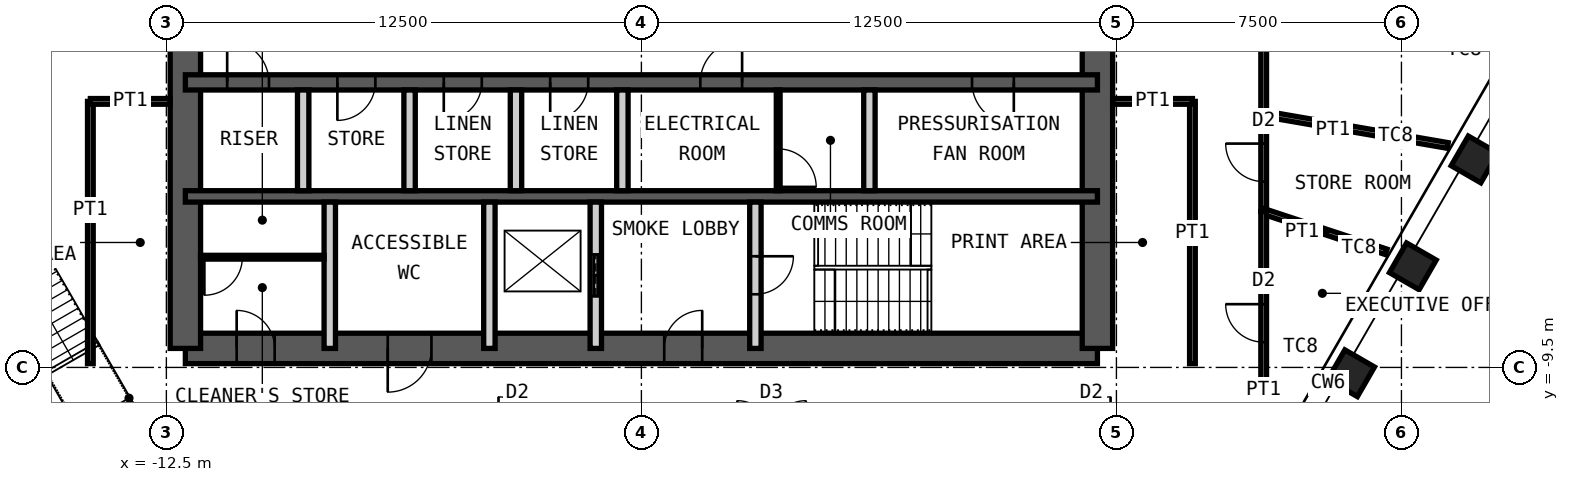
"""IFC4 building model, lengths in metres.
Left out: names, types, materials, properties, quantities, classifications, styles, units other than length and angle.
Written with IfcOpenShell. Run it as: python <this file> out.ifc"""

import sys

from ifc_helpers import new_model, si_unit, direction, frame, frame_2d, origin, origin_2d, place, context, subcontext, project, spatial, rectangle, hollow_rectangle, extrude, element, fill, save


model = new_model("IFC4")
c1 = context("Model", 3, precision=1e-05, world=origin(), true_north=direction((0.0, 1.0)))
c2 = subcontext(c1, "Body", "Model", "MODEL_VIEW")
j1 = project(units=[si_unit("LENGTHUNIT", "METRE"), si_unit("PLANEANGLEUNIT", "RADIAN")], contexts=[c1])
p1 = place(None, origin())
s1 = spatial("IfcSite", under=j1, at=p1, CompositionType="ELEMENT")
p2 = place(p1, origin())
s2 = spatial("IfcBuilding", under=s1, at=p2, CompositionType="ELEMENT")
p3 = place(p2, frame((0.0, 0.0, 329.2)))
s3 = spatial("IfcBuildingStorey", under=s2, at=p3, CompositionType="ELEMENT", Elevation=329.2)
for number, where, z_axis, x_axis in (
    (1, (21.924, -4.027, 0.0), (0.0, 0.0, 1.0), (0.5, 0.866, 0.0)),
    (2, (20.3, -6.84, 0.0), (0.0, 0.0, 1.0), (0.5, 0.866, 0.0)),
    (3, (18.676, -9.653, 0.0), (0.0, 0.0, 1.0), (0.5, 0.866, 0.0)),
):
    element("IfcColumn", number, at=place(p3, frame(where, z_axis=z_axis, x_axis=x_axis)), inside=s3, PredefinedType="COLUMN", context=c2, shape_type="SweptSolid", body=[
        extrude(hollow_rectangle(XDim=0.9, YDim=0.9, WallThickness=0.05, at=origin_2d()), origin(), (0.0, 0.0, 1.0), 4.2),
    ])
p4 = place(p3, frame((-12.0, -9.0, 0.0), z_axis=(0.0, 0.0, 1.0), x_axis=(1.0, 0.0, 0.0)))
e4 = element("IfcWall", 4, at=p4, inside=s3, PredefinedType="SHEAR", context=c2, shape_type="SweptSolid", body=[
    extrude(rectangle(XDim=24.0, YDim=0.8, at=frame_2d((12.0, 0.0))), origin(), (0.0, 0.0, 1.0), 4.2),
])
p5 = place(p4, frame((1.35, 0.0, 0.0)))
e5 = element("IfcOpeningElement", 5, at=p5, cuts=e4, PredefinedType="OPENING", context=c2, shape_type="SweptSolid", body=[
    extrude(rectangle(XDim=1.0, YDim=2.1, at=frame_2d((0.5, 1.05))), frame((0.0, 0.41, 0.0), z_axis=(0.0, -1.0, 0.0), x_axis=(1.0, 0.0, 0.0)), (0.0, 0.0, 1.0), 0.82),
])
p6 = place(p4, frame((5.325, 0.0, 0.0)))
e6 = element("IfcOpeningElement", 6, at=p6, cuts=e4, PredefinedType="OPENING", context=c2, shape_type="SweptSolid", body=[
    extrude(rectangle(XDim=1.15, YDim=2.1, at=frame_2d((0.575, 1.05))), frame((0.0, 0.41, 0.0), z_axis=(0.0, -1.0, 0.0), x_axis=(1.0, 0.0, 0.0)), (0.0, 0.0, 1.0), 0.82),
])
p7 = place(p4, frame((12.6, 0.0, 0.0)))
e7 = element("IfcOpeningElement", 7, at=p7, cuts=e4, PredefinedType="OPENING", context=c2, shape_type="SweptSolid", body=[
    extrude(rectangle(XDim=1.0, YDim=2.1, at=frame_2d((0.5, 1.05))), frame((0.0, 0.41, 0.0), z_axis=(0.0, -1.0, 0.0), x_axis=(1.0, 0.0, 0.0)), (0.0, 0.0, 1.0), 0.82),
])
p8 = place(p3, frame((12.0, -9.0, 0.0), z_axis=(0.0, 0.0, 1.0), x_axis=(0.0, 1.0, 0.0)))
e8 = element("IfcWall", 8, at=p8, inside=s3, PredefinedType="SHEAR", context=c2, shape_type="SweptSolid", body=[
    extrude(rectangle(XDim=18.0, YDim=0.8, at=frame_2d((9.0, 0.0))), origin(), (0.0, 0.0, 1.0), 4.2),
])
p9 = place(p8, frame((8.1, 0.0, 0.0)))
e9 = element("IfcOpeningElement", 9, at=p9, cuts=e8, PredefinedType="OPENING", context=c2, shape_type="SweptSolid", body=[
    extrude(rectangle(XDim=1.8, YDim=2.1, at=frame_2d((0.9, 1.05))), frame((0.0, 0.41, 0.0), z_axis=(0.0, -1.0, 0.0), x_axis=(1.0, 0.0, 0.0)), (0.0, 0.0, 1.0), 0.82),
])
p10 = place(p3, frame((-12.0, -9.0, 0.0), z_axis=(0.0, 0.0, 1.0), x_axis=(0.0, 1.0, 0.0)))
e10 = element("IfcWall", 10, at=p10, inside=s3, PredefinedType="SHEAR", context=c2, shape_type="SweptSolid", body=[
    extrude(rectangle(XDim=18.0, YDim=0.8, at=frame_2d((9.0, 0.0))), origin(), (0.0, 0.0, 1.0), 4.2),
])
p11 = place(p10, frame((8.1, 0.0, 0.0)))
e11 = element("IfcOpeningElement", 11, at=p11, cuts=e10, PredefinedType="OPENING", context=c2, shape_type="SweptSolid", body=[
    extrude(rectangle(XDim=1.8, YDim=2.1, at=frame_2d((0.9, 1.05))), frame((0.0, 0.41, 0.0), z_axis=(0.0, -1.0, 0.0), x_axis=(1.0, 0.0, 0.0)), (0.0, 0.0, 1.0), 0.82),
])
p12 = place(p3, frame((-12.0, -2.0, 0.0), z_axis=(0.0, 0.0, 1.0), x_axis=(1.0, 0.0, 0.0)))
e12 = element("IfcWall", 12, at=p12, inside=s3, PredefinedType="SHEAR", context=c2, shape_type="SweptSolid", body=[
    extrude(rectangle(XDim=24.0, YDim=0.4, at=frame_2d((12.0, 0.0))), origin(), (0.0, 0.0, 1.0), 4.2),
])
p13 = place(p12, frame((1.1, 0.0, 0.0)))
e13 = element("IfcOpeningElement", 13, at=p13, cuts=e12, PredefinedType="OPENING", context=c2, shape_type="SweptSolid", body=[
    extrude(rectangle(XDim=1.1, YDim=2.1, at=frame_2d((0.55, 1.05))), frame((0.0, 0.21, 0.0), z_axis=(0.0, -1.0, 0.0), x_axis=(1.0, 0.0, 0.0)), (0.0, 0.0, 1.0), 0.42),
])
p14 = place(p12, frame((13.55, 0.0, 0.0)))
e14 = element("IfcOpeningElement", 14, at=p14, cuts=e12, PredefinedType="OPENING", context=c2, shape_type="SweptSolid", body=[
    extrude(rectangle(XDim=1.1, YDim=2.1, at=frame_2d((0.55, 1.05))), frame((0.0, 0.21, 0.0), z_axis=(0.0, -1.0, 0.0), x_axis=(1.0, 0.0, 0.0)), (0.0, 0.0, 1.0), 0.42),
])
p15 = place(p12, frame((20.7, 0.0, 0.0)))
e15 = element("IfcOpeningElement", 15, at=p15, cuts=e12, PredefinedType="OPENING", context=c2, shape_type="SweptSolid", body=[
    extrude(rectangle(XDim=1.1, YDim=2.1, at=frame_2d((0.55, 1.05))), frame((0.0, 0.21, 0.0), z_axis=(0.0, -1.0, 0.0), x_axis=(1.0, 0.0, 0.0)), (0.0, 0.0, 1.0), 0.42),
])
p16 = place(p12, frame((4.0, 0.0, 0.0)))
e16 = element("IfcOpeningElement", 16, at=p16, cuts=e12, PredefinedType="OPENING", context=c2, shape_type="SweptSolid", body=[
    extrude(rectangle(XDim=1.0, YDim=2.1, at=frame_2d((0.5, 1.05))), frame((0.0, 0.21, 0.0), z_axis=(0.0, -1.0, 0.0), x_axis=(1.0, 0.0, 0.0)), (0.0, 0.0, 1.0), 0.42),
])
p17 = place(p12, frame((6.8, 0.0, 0.0)))
e17 = element("IfcOpeningElement", 17, at=p17, cuts=e12, PredefinedType="OPENING", context=c2, shape_type="SweptSolid", body=[
    extrude(rectangle(XDim=1.0, YDim=2.1, at=frame_2d((0.5, 1.05))), frame((0.0, 0.21, 0.0), z_axis=(0.0, -1.0, 0.0), x_axis=(1.0, 0.0, 0.0)), (0.0, 0.0, 1.0), 0.42),
])
p18 = place(p12, frame((9.6, 0.0, 0.0)))
e18 = element("IfcOpeningElement", 18, at=p18, cuts=e12, PredefinedType="OPENING", context=c2, shape_type="SweptSolid", body=[
    extrude(rectangle(XDim=1.0, YDim=2.1, at=frame_2d((0.5, 1.05))), frame((0.0, 0.21, 0.0), z_axis=(0.0, -1.0, 0.0), x_axis=(1.0, 0.0, 0.0)), (0.0, 0.0, 1.0), 0.42),
])
p19 = place(p3, frame((-12.0, -5.0, 0.0), z_axis=(0.0, 0.0, 1.0), x_axis=(1.0, 0.0, 0.0)))
e19 = element("IfcWall", 19, at=p19, inside=s3, PredefinedType="SHEAR", context=c2, shape_type="SweptSolid", body=[
    extrude(rectangle(XDim=24.0, YDim=0.3, at=frame_2d((12.0, 0.0))), origin(), (0.0, 0.0, 1.0), 4.2),
])
for number, where, z_axis, x_axis in (
    (20, (-8.9, -4.85, 0.0), (0.0, 0.0, 1.0), (0.0, 1.0, 0.0)),
    (21, (-6.1, -4.85, 0.0), (0.0, 0.0, 1.0), (0.0, 1.0, 0.0)),
    (22, (-3.3, -4.85, 0.0), (0.0, 0.0, 1.0), (0.0, 1.0, 0.0)),
    (23, (-0.5, -4.85, 0.0), (0.0, 0.0, 1.0), (0.0, 1.0, 0.0)),
    (24, (6.0, -4.85, 0.0), (0.0, 0.0, 1.0), (0.0, 1.0, 0.0)),
):
    element("IfcWall", number, at=place(p3, frame(where, z_axis=z_axis, x_axis=x_axis)), inside=s3, PredefinedType="PARTITIONING", context=c2, shape_type="SweptSolid", body=[
        extrude(rectangle(XDim=2.65, YDim=0.3, at=frame_2d((1.325, 0.0))), origin(), (0.0, 0.0, 1.0), 3.98),
    ])
for number, where, z_axis, x_axis in (
    (25, (-8.2, -9.0, 0.0), (0.0, 0.0, 1.0), (0.0, 1.0, 0.0)),
    (26, (-4.0, -9.0, 0.0), (0.0, 0.0, 1.0), (0.0, 1.0, 0.0)),
):
    element("IfcWall", number, at=place(p3, frame(where, z_axis=z_axis, x_axis=x_axis)), inside=s3, PredefinedType="PARTITIONING", context=c2, shape_type="SweptSolid", body=[
        extrude(rectangle(XDim=3.85, YDim=0.3, at=frame_2d((1.925, 0.0))), origin(), (0.0, 0.0, 1.0), 3.98),
    ])
p20 = place(p3, frame((-1.2, -9.0, 0.0), z_axis=(0.0, 0.0, 1.0), x_axis=(0.0, 1.0, 0.0)))
e27 = element("IfcWall", 27, at=p20, inside=s3, PredefinedType="PARTITIONING", context=c2, shape_type="SweptSolid", body=[
    extrude(rectangle(XDim=3.85, YDim=0.3, at=frame_2d((1.925, 0.0))), origin(), (0.0, 0.0, 1.0), 3.98),
])
p21 = place(p20, frame((1.375, 0.0, 0.0)))
e28 = element("IfcOpeningElement", 28, at=p21, cuts=e27, PredefinedType="OPENING", context=c2, shape_type="SweptSolid", body=[
    extrude(rectangle(XDim=1.1, YDim=2.4, at=frame_2d((0.55, 1.2))), frame((0.0, 0.16, 0.0), z_axis=(0.0, -1.0, 0.0), x_axis=(1.0, 0.0, 0.0)), (0.0, 0.0, 1.0), 0.32),
])
p22 = place(p3, frame((3.0, -9.0, 0.0), z_axis=(0.0, 0.0, 1.0), x_axis=(0.0, 1.0, 0.0)))
e29 = element("IfcWall", 29, at=p22, inside=s3, PredefinedType="PARTITIONING", context=c2, shape_type="SweptSolid", body=[
    extrude(rectangle(XDim=3.85, YDim=0.3, at=frame_2d((1.925, 0.0))), origin(), (0.0, 0.0, 1.0), 3.98),
])
p23 = place(p22, frame((1.425, 0.0, 0.0)))
e30 = element("IfcOpeningElement", 30, at=p23, cuts=e29, PredefinedType="OPENING", context=c2, shape_type="SweptSolid", body=[
    extrude(rectangle(XDim=1.0, YDim=2.1, at=frame_2d((0.5, 1.05))), frame((0.0, 0.16, 0.0), z_axis=(0.0, -1.0, 0.0), x_axis=(1.0, 0.0, 0.0)), (0.0, 0.0, 1.0), 0.32),
])
p24 = place(p3, frame((3.6, -4.85, 0.0), z_axis=(0.0, 0.0, 1.0), x_axis=(0.0, 1.0, 0.0)))
e31 = element("IfcWall", 31, at=p24, inside=s3, PredefinedType="PARTITIONING", context=c2, shape_type="SweptSolid", body=[
    extrude(rectangle(XDim=2.65, YDim=0.1, at=frame_2d((1.325, 0.0))), origin(), (0.0, 0.0, 1.0), 3.98),
])
p25 = place(p24, frame((0.1, 0.0, 0.0)))
e32 = element("IfcOpeningElement", 32, at=p25, cuts=e31, PredefinedType="OPENING", context=c2, shape_type="SweptSolid", body=[
    extrude(rectangle(XDim=1.0, YDim=2.4, at=frame_2d((0.5, 1.2))), frame((0.0, 0.06, 0.0), z_axis=(0.0, -1.0, 0.0), x_axis=(1.0, 0.0, 0.0)), (0.0, 0.0, 1.0), 0.12),
])
p26 = place(p3, frame((-11.6, -6.6, 0.0), z_axis=(0.0, 0.0, 1.0), x_axis=(1.0, 0.0, 0.0)))
e33 = element("IfcWall", 33, at=p26, inside=s3, PredefinedType="PARTITIONING", context=c2, shape_type="SweptSolid", body=[
    extrude(rectangle(XDim=3.25, YDim=0.1, at=frame_2d((1.625, 0.0))), origin(), (0.0, 0.0, 1.0), 3.98),
])
p27 = place(p26, frame((0.1, 0.0, 0.0)))
e34 = element("IfcOpeningElement", 34, at=p27, cuts=e33, PredefinedType="OPENING", context=c2, shape_type="SweptSolid", body=[
    extrude(rectangle(XDim=1.0, YDim=2.4, at=frame_2d((0.5, 1.2))), frame((0.0, 0.06, 0.0), z_axis=(0.0, -1.0, 0.0), x_axis=(1.0, 0.0, 0.0)), (0.0, 0.0, 1.0), 0.12),
])
p28 = place(p3, frame((16.375, 1.767, 0.0), z_axis=(0.0, 0.0, 1.0), x_axis=(0.0, -1.0, 0.0)))
e35 = element("IfcWall", 35, at=p28, inside=s3, PredefinedType="PARTITIONING", context=c2, shape_type="SweptSolid", body=[
    extrude(rectangle(XDim=4.591, YDim=0.15, at=frame_2d((2.296, 0.0))), origin(), (0.0, 0.0, 1.0), 4.03),
])
p29 = place(p28, frame((1.796, 0.0, 0.0)))
e36 = element("IfcOpeningElement", 36, at=p29, cuts=e35, PredefinedType="OPENING", context=c2, shape_type="SweptSolid", body=[
    extrude(rectangle(XDim=1.0, YDim=2.4, at=frame_2d((0.5, 1.2))), frame((0.0, 0.085, 0.0), z_axis=(0.0, -1.0, 0.0), x_axis=(1.0, 0.0, 0.0)), (0.0, 0.0, 1.0), 0.17),
])
p30 = place(p3, frame((21.219, -3.66, 0.0), z_axis=(0.0, 0.0, 1.0), x_axis=(-0.98545065103, 0.169961802723, 0.0)))
e37 = element("IfcWall", 37, at=p30, inside=s3, PredefinedType="PARTITIONING", context=c2, shape_type="SweptSolid", body=[
    extrude(rectangle(XDim=4.916, YDim=0.15, at=frame_2d((2.458, 0.0))), origin(), (0.0, 0.0, 1.0), 4.03),
])
p31 = place(p3, frame((16.375, -2.825, 0.0), z_axis=(0.0, 0.0, 1.0), x_axis=(0.0, -1.0, 0.0)))
e38 = element("IfcWall", 38, at=p31, inside=s3, PredefinedType="PARTITIONING", context=c2, shape_type="SweptSolid", body=[
    extrude(rectangle(XDim=2.572, YDim=0.15, at=frame_2d((1.286, 0.0))), origin(), (0.0, 0.0, 1.0), 4.03),
])
p32 = place(p31, frame((0.786, 0.0, 0.0)))
e39 = element("IfcOpeningElement", 39, at=p32, cuts=e38, PredefinedType="OPENING", context=c2, shape_type="SweptSolid", body=[
    extrude(rectangle(XDim=1.0, YDim=2.4, at=frame_2d((0.5, 1.2))), frame((0.0, 0.085, 0.0), z_axis=(0.0, -1.0, 0.0), x_axis=(1.0, 0.0, 0.0)), (0.0, 0.0, 1.0), 0.17),
])
p33 = place(p3, frame((19.598, -6.459, 0.0), z_axis=(0.0, 0.0, 1.0), x_axis=(-0.949756799168, 0.312988853532, 0.0)))
e40 = element("IfcWall", 40, at=p33, inside=s3, PredefinedType="PARTITIONING", context=c2, shape_type="SweptSolid", body=[
    extrude(rectangle(XDim=3.394, YDim=0.15, at=frame_2d((1.697, 0.0))), origin(), (0.0, 0.0, 1.0), 3.33),
])
p34 = place(p3, frame((16.375, -5.396, 0.0), z_axis=(0.0, 0.0, 1.0), x_axis=(0.0, -1.0, 0.0)))
e41 = element("IfcWall", 41, at=p34, inside=s3, PredefinedType="PARTITIONING", context=c2, shape_type="SweptSolid", body=[
    extrude(rectangle(XDim=5.878, YDim=0.15, at=frame_2d((2.939, 0.0))), origin(), (0.0, 0.0, 1.0), 4.03),
])
p35 = place(p34, frame((2.439, 0.0, 0.0)))
e42 = element("IfcOpeningElement", 42, at=p35, cuts=e41, PredefinedType="OPENING", context=c2, shape_type="SweptSolid", body=[
    extrude(rectangle(XDim=1.0, YDim=2.4, at=frame_2d((0.5, 1.2))), frame((0.0, 0.085, 0.0), z_axis=(0.0, -1.0, 0.0), x_axis=(1.0, 0.0, 0.0)), (0.0, 0.0, 1.0), 0.17),
])
p36 = place(p3, frame((14.5, -9.4, 0.0), z_axis=(0.0, 0.0, 1.0), x_axis=(0.0, 1.0, 0.0)))
e43 = element("IfcWall", 43, at=p36, inside=s3, PredefinedType="PARTITIONING", context=c2, shape_type="SweptSolid", body=[
    extrude(rectangle(XDim=6.9, YDim=0.15, at=frame_2d((3.45, 0.0))), origin(), (0.0, 0.0, 1.0), 4.03),
])
p37 = place(p3, frame((12.4, -2.5, 0.0), z_axis=(0.0, 0.0, 1.0), x_axis=(1.0, 0.0, 0.0)))
e44 = element("IfcWall", 44, at=p37, inside=s3, PredefinedType="PARTITIONING", context=c2, shape_type="SweptSolid", body=[
    extrude(rectangle(XDim=2.1, YDim=0.15, at=frame_2d((1.05, 0.0))), origin(), (0.0, 0.0, 1.0), 3.33),
])
p38 = place(p3, frame((-14.5, -9.4, 0.0), z_axis=(0.0, 0.0, 1.0), x_axis=(0.0, 1.0, 0.0)))
e45 = element("IfcWall", 45, at=p38, inside=s3, PredefinedType="PARTITIONING", context=c2, shape_type="SweptSolid", body=[
    extrude(rectangle(XDim=6.9, YDim=0.15, at=frame_2d((3.45, 0.0))), origin(), (0.0, 0.0, 1.0), 4.03),
])
p39 = place(p3, frame((-12.4, -2.5, 0.0), z_axis=(0.0, 0.0, 1.0), x_axis=(-1.0, 0.0, 0.0)))
e46 = element("IfcWall", 46, at=p39, inside=s3, PredefinedType="PARTITIONING", context=c2, shape_type="SweptSolid", body=[
    extrude(rectangle(XDim=2.1, YDim=0.15, at=frame_2d((1.05, 0.0))), origin(), (0.0, 0.0, 1.0), 3.53),
])
p40 = place(p5, origin())
e47 = element("IfcDoor", 47, at=p40, inside=s3, OperationType="SINGLE_SWING_RIGHT", PredefinedType="DOOR", context=c2, shape_type="SweptSolid", body=[
    extrude(rectangle(XDim=1.0, YDim=2.1, at=frame_2d((0.5, 1.05))), frame((0.0, 0.025, 0.0), z_axis=(0.0, -1.0, 0.0), x_axis=(1.0, 0.0, 0.0)), (0.0, 0.0, 1.0), 0.05),
])
fill(e5, e47)
p41 = place(p6, origin())
e48 = element("IfcDoor", 48, at=p41, inside=s3, OperationType="SINGLE_SWING_LEFT", PredefinedType="DOOR", context=c2, shape_type="SweptSolid", body=[
    extrude(rectangle(XDim=1.15, YDim=2.1, at=frame_2d((0.575, 1.05))), frame((0.0, 0.025, 0.0), z_axis=(0.0, -1.0, 0.0), x_axis=(1.0, 0.0, 0.0)), (0.0, 0.0, 1.0), 0.05),
])
fill(e6, e48)
p42 = place(p7, origin())
e49 = element("IfcDoor", 49, at=p42, inside=s3, OperationType="SINGLE_SWING_LEFT", PredefinedType="DOOR", context=c2, shape_type="SweptSolid", body=[
    extrude(rectangle(XDim=1.0, YDim=2.1, at=frame_2d((0.5, 1.05))), frame((0.0, 0.025, 0.0), z_axis=(0.0, -1.0, 0.0), x_axis=(1.0, 0.0, 0.0)), (0.0, 0.0, 1.0), 0.05),
])
fill(e7, e49)
p43 = place(p23, origin())
e50 = element("IfcDoor", 50, at=p43, inside=s3, OperationType="SINGLE_SWING_RIGHT", PredefinedType="DOOR", context=c2, shape_type="SweptSolid", body=[
    extrude(rectangle(XDim=1.0, YDim=2.1, at=frame_2d((0.5, 1.05))), frame((0.0, 0.025, 0.0), z_axis=(0.0, -1.0, 0.0), x_axis=(1.0, 0.0, 0.0)), (0.0, 0.0, 1.0), 0.05),
])
fill(e30, e50)
p44 = place(p13, origin())
e51 = element("IfcDoor", 51, at=p44, inside=s3, OperationType="SINGLE_SWING_RIGHT", PredefinedType="DOOR", context=c2, shape_type="SweptSolid", body=[
    extrude(rectangle(XDim=1.1, YDim=2.1, at=frame_2d((0.55, 1.05))), frame((0.0, 0.025, 0.0), z_axis=(0.0, -1.0, 0.0), x_axis=(1.0, 0.0, 0.0)), (0.0, 0.0, 1.0), 0.05),
])
fill(e13, e51)
p45 = place(p14, origin())
e52 = element("IfcDoor", 52, at=p45, inside=s3, OperationType="SINGLE_SWING_LEFT", PredefinedType="DOOR", context=c2, shape_type="SweptSolid", body=[
    extrude(rectangle(XDim=1.1, YDim=2.1, at=frame_2d((0.55, 1.05))), frame((0.0, 0.025, 0.0), z_axis=(0.0, -1.0, 0.0), x_axis=(1.0, 0.0, 0.0)), (0.0, 0.0, 1.0), 0.05),
])
fill(e14, e52)
p46 = place(p15, origin())
e53 = element("IfcDoor", 53, at=p46, inside=s3, OperationType="SINGLE_SWING_RIGHT", PredefinedType="DOOR", context=c2, shape_type="SweptSolid", body=[
    extrude(rectangle(XDim=1.1, YDim=2.1, at=frame_2d((0.55, 1.05))), frame((0.0, 0.025, 0.0), z_axis=(0.0, -1.0, 0.0), x_axis=(1.0, 0.0, 0.0)), (0.0, 0.0, 1.0), 0.05),
])
fill(e15, e53)
p47 = place(p21, origin())
e54 = element("IfcDoor", 54, at=p47, inside=s3, OperationType="DOUBLE_DOOR_SLIDING", PredefinedType="DOOR", context=c2, shape_type="SweptSolid", body=[
    extrude(rectangle(XDim=1.1, YDim=2.4, at=frame_2d((0.55, 1.2))), frame((0.0, 0.025, 0.0), z_axis=(0.0, -1.0, 0.0), x_axis=(1.0, 0.0, 0.0)), (0.0, 0.0, 1.0), 0.05),
])
fill(e28, e54)
p48 = place(p16, origin())
e55 = element("IfcDoor", 55, at=p48, inside=s3, OperationType="SINGLE_SWING_LEFT", PredefinedType="DOOR", context=c2, shape_type="SweptSolid", body=[
    extrude(rectangle(XDim=1.0, YDim=2.1, at=frame_2d((0.5, 1.05))), frame((0.0, 0.025, 0.0), z_axis=(0.0, -1.0, 0.0), x_axis=(1.0, 0.0, 0.0)), (0.0, 0.0, 1.0), 0.05),
])
fill(e16, e55)
p49 = place(p17, origin())
e56 = element("IfcDoor", 56, at=p49, inside=s3, OperationType="SINGLE_SWING_LEFT", PredefinedType="DOOR", context=c2, shape_type="SweptSolid", body=[
    extrude(rectangle(XDim=1.0, YDim=2.1, at=frame_2d((0.5, 1.05))), frame((0.0, 0.025, 0.0), z_axis=(0.0, -1.0, 0.0), x_axis=(1.0, 0.0, 0.0)), (0.0, 0.0, 1.0), 0.05),
])
fill(e17, e56)
p50 = place(p18, origin())
e57 = element("IfcDoor", 57, at=p50, inside=s3, OperationType="SINGLE_SWING_LEFT", PredefinedType="DOOR", context=c2, shape_type="SweptSolid", body=[
    extrude(rectangle(XDim=1.0, YDim=2.1, at=frame_2d((0.5, 1.05))), frame((0.0, 0.025, 0.0), z_axis=(0.0, -1.0, 0.0), x_axis=(1.0, 0.0, 0.0)), (0.0, 0.0, 1.0), 0.05),
])
fill(e18, e57)
p51 = place(p25, origin())
e58 = element("IfcDoor", 58, at=p51, inside=s3, OperationType="SINGLE_SWING_LEFT", PredefinedType="DOOR", context=c2, shape_type="SweptSolid", body=[
    extrude(rectangle(XDim=1.0, YDim=2.4, at=frame_2d((0.5, 1.2))), frame((0.0, 0.025, 0.0), z_axis=(0.0, -1.0, 0.0), x_axis=(1.0, 0.0, 0.0)), (0.0, 0.0, 1.0), 0.05),
])
fill(e32, e58)
p52 = place(p27, origin())
e59 = element("IfcDoor", 59, at=p52, inside=s3, OperationType="SINGLE_SWING_LEFT", PredefinedType="DOOR", context=c2, shape_type="SweptSolid", body=[
    extrude(rectangle(XDim=1.0, YDim=2.4, at=frame_2d((0.5, 1.2))), frame((0.0, 0.025, 0.0), z_axis=(0.0, -1.0, 0.0), x_axis=(1.0, 0.0, 0.0)), (0.0, 0.0, 1.0), 0.05),
])
fill(e34, e59)
p53 = place(p32, origin())
e60 = element("IfcDoor", 60, at=p53, inside=s3, OperationType="SINGLE_SWING_LEFT", PredefinedType="DOOR", context=c2, shape_type="SweptSolid", body=[
    extrude(rectangle(XDim=1.0, YDim=2.4, at=frame_2d((0.5, 1.2))), frame((0.0, 0.025, 0.0), z_axis=(0.0, -1.0, 0.0), x_axis=(1.0, 0.0, 0.0)), (0.0, 0.0, 1.0), 0.05),
])
fill(e39, e60)
p54 = place(p35, origin())
e61 = element("IfcDoor", 61, at=p54, inside=s3, OperationType="SINGLE_SWING_LEFT", PredefinedType="DOOR", context=c2, shape_type="SweptSolid", body=[
    extrude(rectangle(XDim=1.0, YDim=2.4, at=frame_2d((0.5, 1.2))), frame((0.0, 0.025, 0.0), z_axis=(0.0, -1.0, 0.0), x_axis=(1.0, 0.0, 0.0)), (0.0, 0.0, 1.0), 0.05),
])
fill(e42, e61)
save(model, sys.argv[1])
